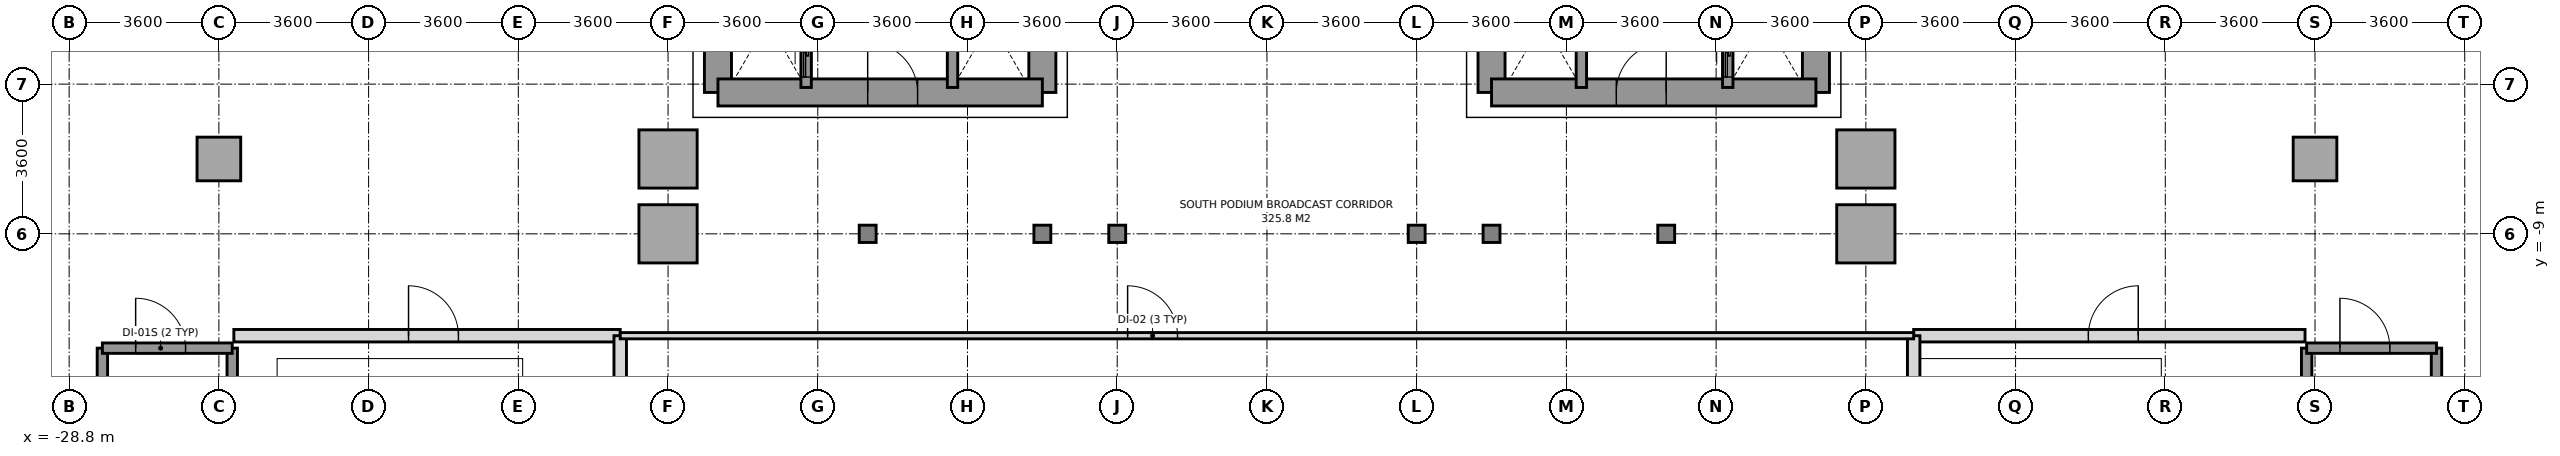
"""IFC4 building model, lengths in metres.
Left out: names, types, materials, properties, quantities, classifications, styles, units other than length and angle.
Written with IfcOpenShell. Run it as: python <this file> out.ifc"""

import sys

from ifc_helpers import new_model, si_unit, direction, frame, frame_2d, origin, origin_2d, place, context, subcontext, project, spatial, rectangle, i_section, extrude, source, transform, mapped, element, fill, save


model = new_model("IFC4")
c1 = context("Model", 3, precision=1e-05, world=origin(), true_north=direction((0.0, 1.0)))
c2 = subcontext(c1, "Body", "Model", "MODEL_VIEW")
j1 = project(units=[si_unit("LENGTHUNIT", "METRE"), si_unit("PLANEANGLEUNIT", "RADIAN")], contexts=[c1])
p1 = place(None, origin())
s1 = spatial("IfcSite", under=j1, at=p1, CompositionType="ELEMENT")
p2 = place(p1, origin())
s2 = spatial("IfcBuilding", under=s1, at=p2, CompositionType="ELEMENT")
p3 = place(p2, frame((0.0, 0.0, 20.4)))
s3 = spatial("IfcBuildingStorey", under=s2, at=p3, CompositionType="ELEMENT", Elevation=20.4)
m1 = source(origin(), c2, "Body", "SweptSolid", [
    extrude(rectangle(XDim=1.05, YDim=1.05, at=origin_2d()), origin(), (0.0, 0.0, 1.0), 4.48),
])
p4 = place(p3, frame((-25.2, -7.2, 0.0), z_axis=(0.0, 0.0, 1.0), x_axis=(1.0, 0.0, 0.0)))
e1 = element("IfcColumn", 1, at=p4, inside=s3, PredefinedType="COLUMN", context=c2, shape_type="MappedRepresentation", body=[
    mapped(m1, transform((0.0, 0.0, 0.0), x_axis=(1.0, 0.0, 0.0), y_axis=(0.0, 1.0, 0.0), z_axis=(0.0, 0.0, 1.0), scale=1.0)),
])
m2 = source(origin(), c2, "Body", "SweptSolid", [
    extrude(rectangle(XDim=1.4, YDim=1.4, at=origin_2d()), origin(), (0.0, 0.0, 1.0), 4.48),
])
for number, where, z_axis, x_axis in (
    (2, (-14.4, -9.0, 0.0), (0.0, 0.0, 1.0), (1.0, 0.0, 0.0)),
    (3, (-14.4, -7.2, 0.0), (0.0, 0.0, 1.0), (1.0, 0.0, 0.0)),
):
    element("IfcColumn", number, at=place(p3, frame(where, z_axis=z_axis, x_axis=x_axis)), inside=s3, PredefinedType="COLUMN", context=c2, shape_type="MappedRepresentation", body=[
        mapped(m2, transform((0.0, 0.0, 0.0), x_axis=(1.0, 0.0, 0.0), y_axis=(0.0, 1.0, 0.0), z_axis=(0.0, 0.0, 1.0), scale=1.0)),
    ])
m3 = source(origin(), c2, "Body", "SweptSolid", [
    extrude(i_section(OverallWidth=0.406, OverallDepth=0.416, WebThickness=0.024, FlangeThickness=0.039, at=origin_2d()), origin(), (0.0, 0.0, 1.0), 4.48),
])
for number, where, z_axis, x_axis in (
    (4, (-9.6, -9.0, 0.0), (0.0, 0.0, 1.0), (1.0, 0.0, 0.0)),
    (5, (-5.4, -9.0, 0.0), (0.0, 0.0, 1.0), (1.0, 0.0, 0.0)),
    (6, (-3.6, -9.0, 0.0), (0.0, 0.0, 1.0), (1.0, 0.0, 0.0)),
    (7, (3.6, -9.0, 0.0), (0.0, 0.0, 1.0), (1.0, 0.0, 0.0)),
    (8, (5.4, -9.0, 0.0), (0.0, 0.0, 1.0), (1.0, 0.0, 0.0)),
    (9, (9.6, -9.0, 0.0), (0.0, 0.0, 1.0), (1.0, 0.0, 0.0)),
):
    element("IfcColumn", number, at=place(p3, frame(where, z_axis=z_axis, x_axis=x_axis)), inside=s3, PredefinedType="COLUMN", context=c2, shape_type="MappedRepresentation", body=[
        mapped(m3, transform((0.0, 0.0, 0.0), x_axis=(1.0, 0.0, 0.0), y_axis=(0.0, 1.0, 0.0), z_axis=(0.0, 0.0, 1.0), scale=1.0)),
    ])
for number, where, z_axis, x_axis in (
    (10, (14.4, -9.0, 0.0), (0.0, 0.0, 1.0), (1.0, 0.0, 0.0)),
    (11, (14.4, -7.2, 0.0), (0.0, 0.0, 1.0), (1.0, 0.0, 0.0)),
):
    element("IfcColumn", number, at=place(p3, frame(where, z_axis=z_axis, x_axis=x_axis)), inside=s3, PredefinedType="COLUMN", context=c2, shape_type="MappedRepresentation", body=[
        mapped(m2, transform((0.0, 0.0, 0.0), x_axis=(1.0, 0.0, 0.0), y_axis=(0.0, 1.0, 0.0), z_axis=(0.0, 0.0, 1.0), scale=1.0)),
    ])
p5 = place(p3, frame((25.2, -7.2, 0.0), z_axis=(0.0, 0.0, 1.0), x_axis=(1.0, 0.0, 0.0)))
e12 = element("IfcColumn", 12, at=p5, inside=s3, PredefinedType="COLUMN", context=c2, shape_type="MappedRepresentation", body=[
    mapped(m1, transform((0.0, 0.0, 0.0), x_axis=(1.0, 0.0, 0.0), y_axis=(0.0, 1.0, 0.0), z_axis=(0.0, 0.0, 1.0), scale=1.0)),
])
p6 = place(p3, frame((-13.2, -5.6, 0.0), z_axis=(0.0, 0.0, 1.0), x_axis=(0.0, 1.0, 0.0)))
e13 = element("IfcWall", 13, at=p6, inside=s3, PredefinedType="SHEAR", context=c2, shape_type="SweptSolid", body=[
    extrude(rectangle(XDim=11.2, YDim=0.65, at=frame_2d((5.6, 0.0))), origin(), (0.0, 0.0, 1.0), 4.48),
])
p7 = place(p3, frame((-5.4, -5.6, 0.0), z_axis=(0.0, 0.0, 1.0), x_axis=(0.0, 1.0, 0.0)))
e14 = element("IfcWall", 14, at=p7, inside=s3, PredefinedType="SHEAR", context=c2, shape_type="SweptSolid", body=[
    extrude(rectangle(XDim=12.5, YDim=0.65, at=frame_2d((6.25, 0.0))), origin(), (0.0, 0.0, 1.0), 4.48),
])
p8 = place(p7, frame((4.55, 0.0, 0.0)))
e15 = element("IfcOpeningElement", 15, at=p8, cuts=e14, PredefinedType="OPENING", context=c2, shape_type="SweptSolid", body=[
    extrude(rectangle(XDim=1.2, YDim=2.2, at=frame_2d((0.6, 1.1))), frame((0.0, 0.335, 0.0), z_axis=(0.0, -1.0, 0.0), x_axis=(1.0, 0.0, 0.0)), (0.0, 0.0, 1.0), 0.67),
])
p9 = place(p7, frame((6.86, 0.0, 0.0)))
e16 = element("IfcOpeningElement", 16, at=p9, cuts=e14, PredefinedType="OPENING", context=c2, shape_type="SweptSolid", body=[
    extrude(rectangle(XDim=0.8, YDim=2.1, at=frame_2d((0.4, 1.05))), frame((0.0, 0.335, 0.0), z_axis=(0.0, -1.0, 0.0), x_axis=(1.0, 0.0, 0.0)), (0.0, 0.0, 1.0), 0.67),
])
p10 = place(p3, frame((-13.2, -5.6, 0.0), z_axis=(0.0, 0.0, 1.0), x_axis=(1.0, 0.0, 0.0)))
e17 = element("IfcWall", 17, at=p10, inside=s3, PredefinedType="SHEAR", context=c2, shape_type="SweptSolid", body=[
    extrude(rectangle(XDim=7.8, YDim=0.65, at=frame_2d((3.9, 0.0))), origin(), (0.0, 0.0, 1.0), 4.48),
])
p11 = place(p10, frame((3.6, 0.0, 0.0)))
e18 = element("IfcOpeningElement", 18, at=p11, cuts=e17, PredefinedType="OPENING", context=c2, shape_type="SweptSolid", body=[
    extrude(rectangle(XDim=1.2, YDim=2.2, at=frame_2d((0.6, 1.1))), frame((0.0, 0.335, 0.0), z_axis=(0.0, -1.0, 0.0), x_axis=(1.0, 0.0, 0.0)), (0.0, 0.0, 1.0), 0.67),
])
p12 = place(p3, frame((13.2, -5.6, 0.0), z_axis=(0.0, 0.0, 1.0), x_axis=(0.0, 1.0, 0.0)))
e19 = element("IfcWall", 19, at=p12, inside=s3, PredefinedType="SHEAR", context=c2, shape_type="SweptSolid", body=[
    extrude(rectangle(XDim=11.2, YDim=0.65, at=frame_2d((5.6, 0.0))), origin(), (0.0, 0.0, 1.0), 4.48),
])
p13 = place(p3, frame((5.4, -5.6, 0.0), z_axis=(0.0, 0.0, 1.0), x_axis=(0.0, 1.0, 0.0)))
e20 = element("IfcWall", 20, at=p13, inside=s3, PredefinedType="SHEAR", context=c2, shape_type="SweptSolid", body=[
    extrude(rectangle(XDim=12.5, YDim=0.65, at=frame_2d((6.25, 0.0))), origin(), (0.0, 0.0, 1.0), 4.48),
])
p14 = place(p13, frame((4.55, 0.0, 0.0)))
e21 = element("IfcOpeningElement", 21, at=p14, cuts=e20, PredefinedType="OPENING", context=c2, shape_type="SweptSolid", body=[
    extrude(rectangle(XDim=1.2, YDim=2.2, at=frame_2d((0.6, 1.1))), frame((0.0, 0.335, 0.0), z_axis=(0.0, -1.0, 0.0), x_axis=(1.0, 0.0, 0.0)), (0.0, 0.0, 1.0), 0.67),
])
p15 = place(p13, frame((6.86, 0.0, 0.0)))
e22 = element("IfcOpeningElement", 22, at=p15, cuts=e20, PredefinedType="OPENING", context=c2, shape_type="SweptSolid", body=[
    extrude(rectangle(XDim=0.8, YDim=2.1, at=frame_2d((0.4, 1.05))), frame((0.0, 0.335, 0.0), z_axis=(0.0, -1.0, 0.0), x_axis=(1.0, 0.0, 0.0)), (0.0, 0.0, 1.0), 0.67),
])
p16 = place(p13, frame((7.88, 0.0, 0.0)))
e23 = element("IfcOpeningElement", 23, at=p16, cuts=e20, PredefinedType="OPENING", context=c2, shape_type="SweptSolid", body=[
    extrude(rectangle(XDim=0.8, YDim=2.1, at=frame_2d((0.4, 1.05))), frame((0.0, 0.335, 0.0), z_axis=(0.0, -1.0, 0.0), x_axis=(1.0, 0.0, 0.0)), (0.0, 0.0, 1.0), 0.67),
])
p17 = place(p3, frame((5.4, -5.6, 0.0), z_axis=(0.0, 0.0, 1.0), x_axis=(1.0, 0.0, 0.0)))
e24 = element("IfcWall", 24, at=p17, inside=s3, PredefinedType="SHEAR", context=c2, shape_type="SweptSolid", body=[
    extrude(rectangle(XDim=7.8, YDim=0.65, at=frame_2d((3.9, 0.0))), origin(), (0.0, 0.0, 1.0), 4.48),
])
p18 = place(p17, frame((3.0, 0.0, 0.0)))
e25 = element("IfcOpeningElement", 25, at=p18, cuts=e24, PredefinedType="OPENING", context=c2, shape_type="SweptSolid", body=[
    extrude(rectangle(XDim=1.2, YDim=2.2, at=frame_2d((0.6, 1.1))), frame((0.0, 0.335, 0.0), z_axis=(0.0, -1.0, 0.0), x_axis=(1.0, 0.0, 0.0)), (0.0, 0.0, 1.0), 0.67),
])
for number, where, z_axis, x_axis in (
    (26, (-28.001, -18.671, 0.0), (0.0, 0.0, 1.0), (0.0, 1.0, 0.0)),
    (27, (-24.879, -18.671, 0.0), (0.0, 0.0, 1.0), (0.0, 1.0, 0.0)),
):
    element("IfcWall", number, at=place(p3, frame(where, z_axis=z_axis, x_axis=x_axis)), inside=s3, PredefinedType="SOLIDWALL", context=c2, shape_type="SweptSolid", body=[
        extrude(rectangle(XDim=6.922, YDim=0.25, at=frame_2d((3.461, 0.0))), origin(), (0.0, 0.0, 1.0), 4.48),
    ])
p19 = place(p3, frame((-28.001, -11.749, 0.0), z_axis=(0.0, 0.0, 1.0), x_axis=(1.0, 0.0, 0.0)))
e28 = element("IfcWall", 28, at=p19, inside=s3, PredefinedType="SOLIDWALL", context=c2, shape_type="SweptSolid", body=[
    extrude(rectangle(XDim=3.122, YDim=0.25, at=frame_2d((1.561, 0.0))), origin(), (0.0, 0.0, 1.0), 4.48),
])
p20 = place(p19, frame((0.8, 0.0, 0.0)))
e29 = element("IfcOpeningElement", 29, at=p20, cuts=e28, PredefinedType="OPENING", context=c2, shape_type="SweptSolid", body=[
    extrude(rectangle(XDim=1.2, YDim=2.2, at=frame_2d((0.6, 1.1))), frame((0.0, 0.135, 0.0), z_axis=(0.0, -1.0, 0.0), x_axis=(1.0, 0.0, 0.0)), (0.0, 0.0, 1.0), 0.27),
])
for number, where, z_axis, x_axis in (
    (30, (24.999, -18.671, 0.0), (0.0, 0.0, 1.0), (0.0, 1.0, 0.0)),
    (31, (28.121, -18.671, 0.0), (0.0, 0.0, 1.0), (0.0, 1.0, 0.0)),
):
    element("IfcWall", number, at=place(p3, frame(where, z_axis=z_axis, x_axis=x_axis)), inside=s3, PredefinedType="SOLIDWALL", context=c2, shape_type="SweptSolid", body=[
        extrude(rectangle(XDim=6.922, YDim=0.25, at=frame_2d((3.461, 0.0))), origin(), (0.0, 0.0, 1.0), 4.48),
    ])
p21 = place(p3, frame((24.999, -11.749, 0.0), z_axis=(0.0, 0.0, 1.0), x_axis=(1.0, 0.0, 0.0)))
e32 = element("IfcWall", 32, at=p21, inside=s3, PredefinedType="SOLIDWALL", context=c2, shape_type="SweptSolid", body=[
    extrude(rectangle(XDim=3.122, YDim=0.25, at=frame_2d((1.561, 0.0))), origin(), (0.0, 0.0, 1.0), 4.48),
])
p22 = place(p21, frame((0.8, 0.0, 0.0)))
e33 = element("IfcOpeningElement", 33, at=p22, cuts=e32, PredefinedType="OPENING", context=c2, shape_type="SweptSolid", body=[
    extrude(rectangle(XDim=1.2, YDim=2.2, at=frame_2d((0.6, 1.1))), frame((0.0, 0.135, 0.0), z_axis=(0.0, -1.0, 0.0), x_axis=(1.0, 0.0, 0.0)), (0.0, 0.0, 1.0), 0.27),
])
p23 = place(p3, frame((-11.08, -5.48, 0.0), z_axis=(0.0, 0.0, 1.0), x_axis=(0.0, 1.0, 0.0)))
e34 = element("IfcWall", 34, at=p23, inside=s3, PredefinedType="SOLIDWALL", context=c2, shape_type="SweptSolid", body=[
    extrude(rectangle(XDim=1.6, YDim=0.25, at=frame_2d((0.8, 0.0))), origin(), (0.0, 0.0, 1.0), 4.48),
])
p24 = place(p23, frame((0.25, 0.0, 0.0)))
e35 = element("IfcOpeningElement", 35, at=p24, cuts=e34, PredefinedType="OPENING", context=c2, shape_type="SweptSolid", body=[
    extrude(rectangle(XDim=1.1, YDim=2.2, at=frame_2d((0.55, 1.1))), frame((0.0, 0.135, 0.0), z_axis=(0.0, -1.0, 0.0), x_axis=(1.0, 0.0, 0.0)), (0.0, 0.0, 1.0), 0.27),
])
p25 = place(p3, frame((11.08, -5.48, 0.0), z_axis=(0.0, 0.0, 1.0), x_axis=(0.0, 1.0, 0.0)))
e36 = element("IfcWall", 36, at=p25, inside=s3, PredefinedType="SOLIDWALL", context=c2, shape_type="SweptSolid", body=[
    extrude(rectangle(XDim=1.6, YDim=0.25, at=frame_2d((0.8, 0.0))), origin(), (0.0, 0.0, 1.0), 4.48),
])
p26 = place(p25, frame((0.25, 0.0, 0.0)))
e37 = element("IfcOpeningElement", 37, at=p26, cuts=e36, PredefinedType="OPENING", context=c2, shape_type="SweptSolid", body=[
    extrude(rectangle(XDim=1.1, YDim=2.2, at=frame_2d((0.55, 1.1))), frame((0.0, 0.135, 0.0), z_axis=(0.0, -1.0, 0.0), x_axis=(1.0, 0.0, 0.0)), (0.0, 0.0, 1.0), 0.27),
])
for number, where, z_axis, x_axis in (
    (38, (-7.56, -5.48, 0.0), (0.0, 0.0, 1.0), (0.0, 1.0, 0.0)),
    (39, (7.56, -5.48, 0.0), (0.0, 0.0, 1.0), (0.0, 1.0, 0.0)),
):
    element("IfcWall", number, at=place(p3, frame(where, z_axis=z_axis, x_axis=x_axis)), inside=s3, PredefinedType="SOLIDWALL", context=c2, shape_type="SweptSolid", body=[
        extrude(rectangle(XDim=1.6, YDim=0.25, at=frame_2d((0.8, 0.0))), origin(), (0.0, 0.0, 1.0), 4.48),
    ])
p27 = place(p3, frame((-24.84, -11.45, 0.0), z_axis=(0.0, 0.0, 1.0), x_axis=(1.0, 0.0, 0.0)))
e40 = element("IfcWall", 40, at=p27, inside=s3, PredefinedType="SOLIDWALL", context=c2, shape_type="SweptSolid", body=[
    extrude(rectangle(XDim=9.29, YDim=0.3, at=frame_2d((4.645, 0.0))), origin(), (0.0, 0.0, 1.0), 4.48),
])
p28 = place(p27, frame((4.2, 0.0, 0.0)))
e41 = element("IfcOpeningElement", 41, at=p28, cuts=e40, PredefinedType="OPENING", context=c2, shape_type="SweptSolid", body=[
    extrude(rectangle(XDim=1.2, YDim=2.2, at=frame_2d((0.6, 1.1))), frame((0.0, 0.16, 0.0), z_axis=(0.0, -1.0, 0.0), x_axis=(1.0, 0.0, 0.0)), (0.0, 0.0, 1.0), 0.32),
])
p29 = place(p3, frame((-15.55, -19.45, 0.0), z_axis=(0.0, 0.0, 1.0), x_axis=(0.0, 1.0, 0.0)))
e42 = element("IfcWall", 42, at=p29, inside=s3, PredefinedType="SOLIDWALL", context=c2, shape_type="SweptSolid", body=[
    extrude(rectangle(XDim=8.0, YDim=0.3, at=frame_2d((4.0, 0.0))), origin(), (0.0, 0.0, 1.0), 4.48),
])
p30 = place(p3, frame((15.55, -11.45, 0.0), z_axis=(0.0, 0.0, 1.0), x_axis=(1.0, 0.0, 0.0)))
e43 = element("IfcWall", 43, at=p30, inside=s3, PredefinedType="SOLIDWALL", context=c2, shape_type="SweptSolid", body=[
    extrude(rectangle(XDim=9.41, YDim=0.3, at=frame_2d((4.705, 0.0))), origin(), (0.0, 0.0, 1.0), 4.48),
])
p31 = place(p30, frame((4.2, 0.0, 0.0)))
e44 = element("IfcOpeningElement", 44, at=p31, cuts=e43, PredefinedType="OPENING", context=c2, shape_type="SweptSolid", body=[
    extrude(rectangle(XDim=1.2, YDim=2.2, at=frame_2d((0.6, 1.1))), frame((0.0, 0.16, 0.0), z_axis=(0.0, -1.0, 0.0), x_axis=(1.0, 0.0, 0.0)), (0.0, 0.0, 1.0), 0.32),
])
p32 = place(p3, frame((15.55, -19.45, 0.0), z_axis=(0.0, 0.0, 1.0), x_axis=(0.0, 1.0, 0.0)))
e45 = element("IfcWall", 45, at=p32, inside=s3, PredefinedType="SOLIDWALL", context=c2, shape_type="SweptSolid", body=[
    extrude(rectangle(XDim=8.0, YDim=0.3, at=frame_2d((4.0, 0.0))), origin(), (0.0, 0.0, 1.0), 4.48),
])
p33 = place(p3, frame((-15.55, -11.45, 0.0), z_axis=(0.0, 0.0, 1.0), x_axis=(1.0, 0.0, 0.0)))
e46 = element("IfcWall", 46, at=p33, inside=s3, PredefinedType="PARTITIONING", context=c2, shape_type="SweptSolid", body=[
    extrude(rectangle(XDim=31.1, YDim=0.15, at=frame_2d((15.55, 0.0))), origin(), (0.0, 0.0, 1.0), 4.48),
])
p34 = place(p33, frame((12.2, 0.0, 0.0)))
e47 = element("IfcOpeningElement", 47, at=p34, cuts=e46, PredefinedType="OPENING", context=c2, shape_type="SweptSolid", body=[
    extrude(rectangle(XDim=1.2, YDim=2.2, at=frame_2d((0.6, 1.1))), frame((0.0, 0.085, 0.0), z_axis=(0.0, -1.0, 0.0), x_axis=(1.0, 0.0, 0.0)), (0.0, 0.0, 1.0), 0.17),
])
m4 = source(origin(), c2, "Body", "SweptSolid", [
    extrude(rectangle(XDim=1.2, YDim=2.2, at=frame_2d((0.6, 1.1))), frame((0.0, 0.025, 0.0), z_axis=(0.0, -1.0, 0.0), x_axis=(1.0, 0.0, 0.0)), (0.0, 0.0, 1.0), 0.05),
])
p35 = place(p11, origin())
e48 = element("IfcDoor", 48, at=p35, inside=s3, OperationType="SINGLE_SWING_LEFT", PredefinedType="DOOR", context=c2, shape_type="MappedRepresentation", body=[
    mapped(m4, transform((0.0, 0.0, 0.0), x_axis=(1.0, 0.0, 0.0), y_axis=(0.0, 1.0, 0.0), z_axis=(0.0, 0.0, 1.0), scale=1.0)),
])
fill(e18, e48)
p36 = place(p18, origin())
e49 = element("IfcDoor", 49, at=p36, inside=s3, OperationType="SINGLE_SWING_RIGHT", PredefinedType="DOOR", context=c2, shape_type="MappedRepresentation", body=[
    mapped(m4, transform((0.0, 0.0, 0.0), x_axis=(1.0, 0.0, 0.0), y_axis=(0.0, 1.0, 0.0), z_axis=(0.0, 0.0, 1.0), scale=1.0)),
])
fill(e25, e49)
p37 = place(p20, origin())
e50 = element("IfcDoor", 50, at=p37, inside=s3, OperationType="SINGLE_SWING_LEFT", PredefinedType="DOOR", context=c2, shape_type="MappedRepresentation", body=[
    mapped(m4, transform((0.0, 0.0, 0.0), x_axis=(1.0, 0.0, 0.0), y_axis=(0.0, 1.0, 0.0), z_axis=(0.0, 0.0, 1.0), scale=1.0)),
])
fill(e29, e50)
p38 = place(p22, origin())
e51 = element("IfcDoor", 51, at=p38, inside=s3, OperationType="SINGLE_SWING_LEFT", PredefinedType="DOOR", context=c2, shape_type="MappedRepresentation", body=[
    mapped(m4, transform((0.0, 0.0, 0.0), x_axis=(1.0, 0.0, 0.0), y_axis=(0.0, 1.0, 0.0), z_axis=(0.0, 0.0, 1.0), scale=1.0)),
])
fill(e33, e51)
m5 = source(origin(), c2, "Body", "SweptSolid", [
    extrude(rectangle(XDim=1.1, YDim=2.2, at=frame_2d((0.55, 1.1))), frame((0.0, 0.025, 0.0), z_axis=(0.0, -1.0, 0.0), x_axis=(1.0, 0.0, 0.0)), (0.0, 0.0, 1.0), 0.05),
])
p39 = place(p24, origin())
e52 = element("IfcDoor", 52, at=p39, inside=s3, OperationType="SLIDING_TO_LEFT", PredefinedType="DOOR", context=c2, shape_type="MappedRepresentation", body=[
    mapped(m5, transform((0.0, 0.0, 0.0), x_axis=(1.0, 0.0, 0.0), y_axis=(0.0, 1.0, 0.0), z_axis=(0.0, 0.0, 1.0), scale=1.0)),
])
fill(e35, e52)
p40 = place(p26, origin())
e53 = element("IfcDoor", 53, at=p40, inside=s3, OperationType="SLIDING_TO_LEFT", PredefinedType="DOOR", context=c2, shape_type="MappedRepresentation", body=[
    mapped(m5, transform((0.0, 0.0, 0.0), x_axis=(1.0, 0.0, 0.0), y_axis=(0.0, 1.0, 0.0), z_axis=(0.0, 0.0, 1.0), scale=1.0)),
])
fill(e37, e53)
p41 = place(p28, origin())
e54 = element("IfcDoor", 54, at=p41, inside=s3, OperationType="SINGLE_SWING_LEFT", PredefinedType="DOOR", context=c2, shape_type="MappedRepresentation", body=[
    mapped(m4, transform((0.0, 0.0, 0.0), x_axis=(1.0, 0.0, 0.0), y_axis=(0.0, 1.0, 0.0), z_axis=(0.0, 0.0, 1.0), scale=1.0)),
])
fill(e41, e54)
p42 = place(p31, origin())
e55 = element("IfcDoor", 55, at=p42, inside=s3, OperationType="SINGLE_SWING_RIGHT", PredefinedType="DOOR", context=c2, shape_type="MappedRepresentation", body=[
    mapped(m4, transform((0.0, 0.0, 0.0), x_axis=(1.0, 0.0, 0.0), y_axis=(0.0, 1.0, 0.0), z_axis=(0.0, 0.0, 1.0), scale=1.0)),
])
fill(e44, e55)
p43 = place(p34, origin())
e56 = element("IfcDoor", 56, at=p43, inside=s3, OperationType="SINGLE_SWING_LEFT", PredefinedType="DOOR", context=c2, shape_type="MappedRepresentation", body=[
    mapped(m4, transform((0.0, 0.0, 0.0), x_axis=(1.0, 0.0, 0.0), y_axis=(0.0, 1.0, 0.0), z_axis=(0.0, 0.0, 1.0), scale=1.0)),
])
fill(e47, e56)
save(model, sys.argv[1])
